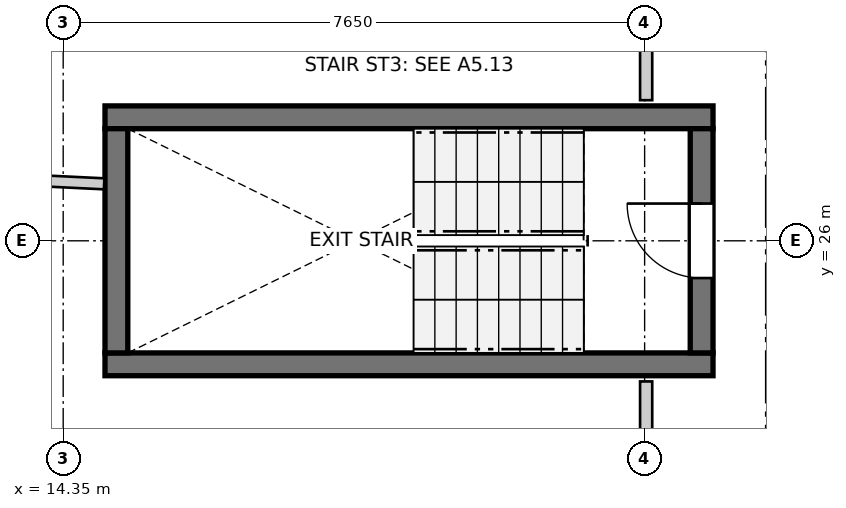
"""IFC4 building model, lengths in metres.
Left out: names, types, materials, properties, quantities, classifications, styles, units other than length and angle.
Written with IfcOpenShell. Run it as: python <this file> out.ifc"""

import sys

from ifc_helpers import new_model, si_unit, direction, frame, frame_2d, origin, place, context, subcontext, project, spatial, rectangle, extrude, source, transform, mapped, element, fill, save


model = new_model("IFC4")
c1 = context("Model", 3, precision=1e-05, world=origin(), true_north=direction((0.0, 1.0)))
c2 = subcontext(c1, "Body", "Model", "MODEL_VIEW")
j1 = project(units=[si_unit("LENGTHUNIT", "METRE"), si_unit("PLANEANGLEUNIT", "RADIAN")], contexts=[c1])
p1 = place(None, origin())
s1 = spatial("IfcSite", under=j1, at=p1, CompositionType="ELEMENT")
p2 = place(p1, origin())
s2 = spatial("IfcBuilding", under=s1, at=p2, CompositionType="ELEMENT")
p3 = place(p2, frame((0.0, 0.0, 39.8)))
s3 = spatial("IfcBuildingStorey", under=s2, at=p3, CompositionType="ELEMENT", Elevation=39.8)
for number, where, z_axis, x_axis in (
    (1, (14.9, 24.375, 0.0), (0.0, 0.0, 1.0), (1.0, 0.0, 0.0)),
    (2, (22.9, 27.625, 0.0), (0.0, 0.0, 1.0), (-1.0, 0.0, 0.0)),
):
    element("IfcWall", number, at=place(p3, frame(where, z_axis=z_axis, x_axis=x_axis)), inside=s3, PredefinedType="SHEAR", context=c2, shape_type="SweptSolid", body=[
        extrude(rectangle(XDim=8.0, YDim=0.3, at=frame_2d((4.0, 0.0))), origin(), (0.0, 0.0, 1.0), 2.94),
    ])
p4 = place(p3, frame((15.05, 27.475, 0.0), z_axis=(0.0, 0.0, 1.0), x_axis=(0.0, -1.0, 0.0)))
e3 = element("IfcWall", 3, at=p4, inside=s3, PredefinedType="SHEAR", context=c2, shape_type="SweptSolid", body=[
    extrude(rectangle(XDim=2.95, YDim=0.3, at=frame_2d((1.475, 0.0))), origin(), (0.0, 0.0, 1.0), 2.94),
])
p5 = place(p3, frame((22.75, 24.525, 0.0), z_axis=(0.0, 0.0, 1.0), x_axis=(0.0, 1.0, 0.0)))
e4 = element("IfcWall", 4, at=p5, inside=s3, PredefinedType="SHEAR", context=c2, shape_type="SweptSolid", body=[
    extrude(rectangle(XDim=2.95, YDim=0.3, at=frame_2d((1.475, 0.0))), origin(), (0.0, 0.0, 1.0), 2.94),
])
p6 = place(p5, frame((0.985, 0.0, 0.0)))
e5 = element("IfcOpeningElement", 5, at=p6, cuts=e4, PredefinedType="OPENING", context=c2, shape_type="SweptSolid", body=[
    extrude(rectangle(XDim=0.98, YDim=2.15, at=frame_2d((0.49, 1.075))), frame((0.0, 0.16, 0.0), z_axis=(0.0, -1.0, 0.0), x_axis=(1.0, 0.0, 0.0)), (0.0, 0.0, 1.0), 0.32),
])
p7 = place(p3, frame((22.02, 18.722, 0.0), z_axis=(0.0, 0.0, 1.0), x_axis=(0.0, 1.0, 0.0)))
e6 = element("IfcWall", 6, at=p7, inside=s3, PredefinedType="PARTITIONING", context=c2, shape_type="SweptSolid", body=[
    extrude(rectangle(XDim=5.428, YDim=0.16, at=frame_2d((2.714, 0.0))), origin(), (0.0, 0.0, 1.0), 2.94),
])
p8 = place(p7, frame((1.996, 0.0, 0.0)))
e7 = element("IfcOpeningElement", 7, at=p8, cuts=e6, PredefinedType="OPENING", context=c2, shape_type="SweptSolid", body=[
    extrude(rectangle(XDim=0.96, YDim=2.1, at=frame_2d((0.48, 1.05))), frame((0.0, 0.09, 0.0), z_axis=(0.0, -1.0, 0.0), x_axis=(1.0, 0.0, 0.0)), (0.0, 0.0, 1.0), 0.18),
])
p9 = place(p3, frame((22.02, 27.85, 0.0), z_axis=(0.0, 0.0, 1.0), x_axis=(0.0, 1.0, 0.0)))
e8 = element("IfcWall", 8, at=p9, inside=s3, PredefinedType="PARTITIONING", context=c2, shape_type="SweptSolid", body=[
    extrude(rectangle(XDim=3.569, YDim=0.16, at=frame_2d((1.784, 0.0))), origin(), (0.0, 0.0, 1.0), 2.94),
])
p10 = place(p9, frame((1.325, 0.0, 0.0)))
e9 = element("IfcOpeningElement", 9, at=p10, cuts=e8, PredefinedType="OPENING", context=c2, shape_type="SweptSolid", body=[
    extrude(rectangle(XDim=0.96, YDim=2.1, at=frame_2d((0.48, 1.05))), frame((0.0, 0.09, 0.0), z_axis=(0.0, -1.0, 0.0), x_axis=(1.0, 0.0, 0.0)), (0.0, 0.0, 1.0), 0.18),
])
p11 = place(p3, frame((3.765, 27.289, 0.0), z_axis=(0.0, 0.0, 1.0), x_axis=(0.998826748689, -0.048426502082, 0.0)))
e10 = element("IfcWall", 10, at=p11, inside=s3, PredefinedType="PARTITIONING", context=c2, shape_type="SweptSolid", body=[
    extrude(rectangle(XDim=11.137, YDim=0.145, at=frame_2d((5.568, 0.0))), origin(), (0.0, 0.0, 1.0), 2.94),
])
m1 = source(origin(), c2, "Body", "SweptSolid", [
    extrude(rectangle(XDim=0.98, YDim=2.15, at=frame_2d((0.49, 1.075))), frame((0.0, 0.025, 0.0), z_axis=(0.0, -1.0, 0.0), x_axis=(1.0, 0.0, 0.0)), (0.0, 0.0, 1.0), 0.05),
])
p12 = place(p6, origin())
e11 = element("IfcDoor", 11, at=p12, inside=s3, OperationType="SINGLE_SWING_RIGHT", PredefinedType="DOOR", context=c2, shape_type="MappedRepresentation", body=[
    mapped(m1, transform((0.0, 0.0, 0.0), x_axis=(1.0, 0.0, 0.0), y_axis=(0.0, 1.0, 0.0), z_axis=(0.0, 0.0, 1.0), scale=1.0)),
])
fill(e5, e11)
save(model, sys.argv[1])
